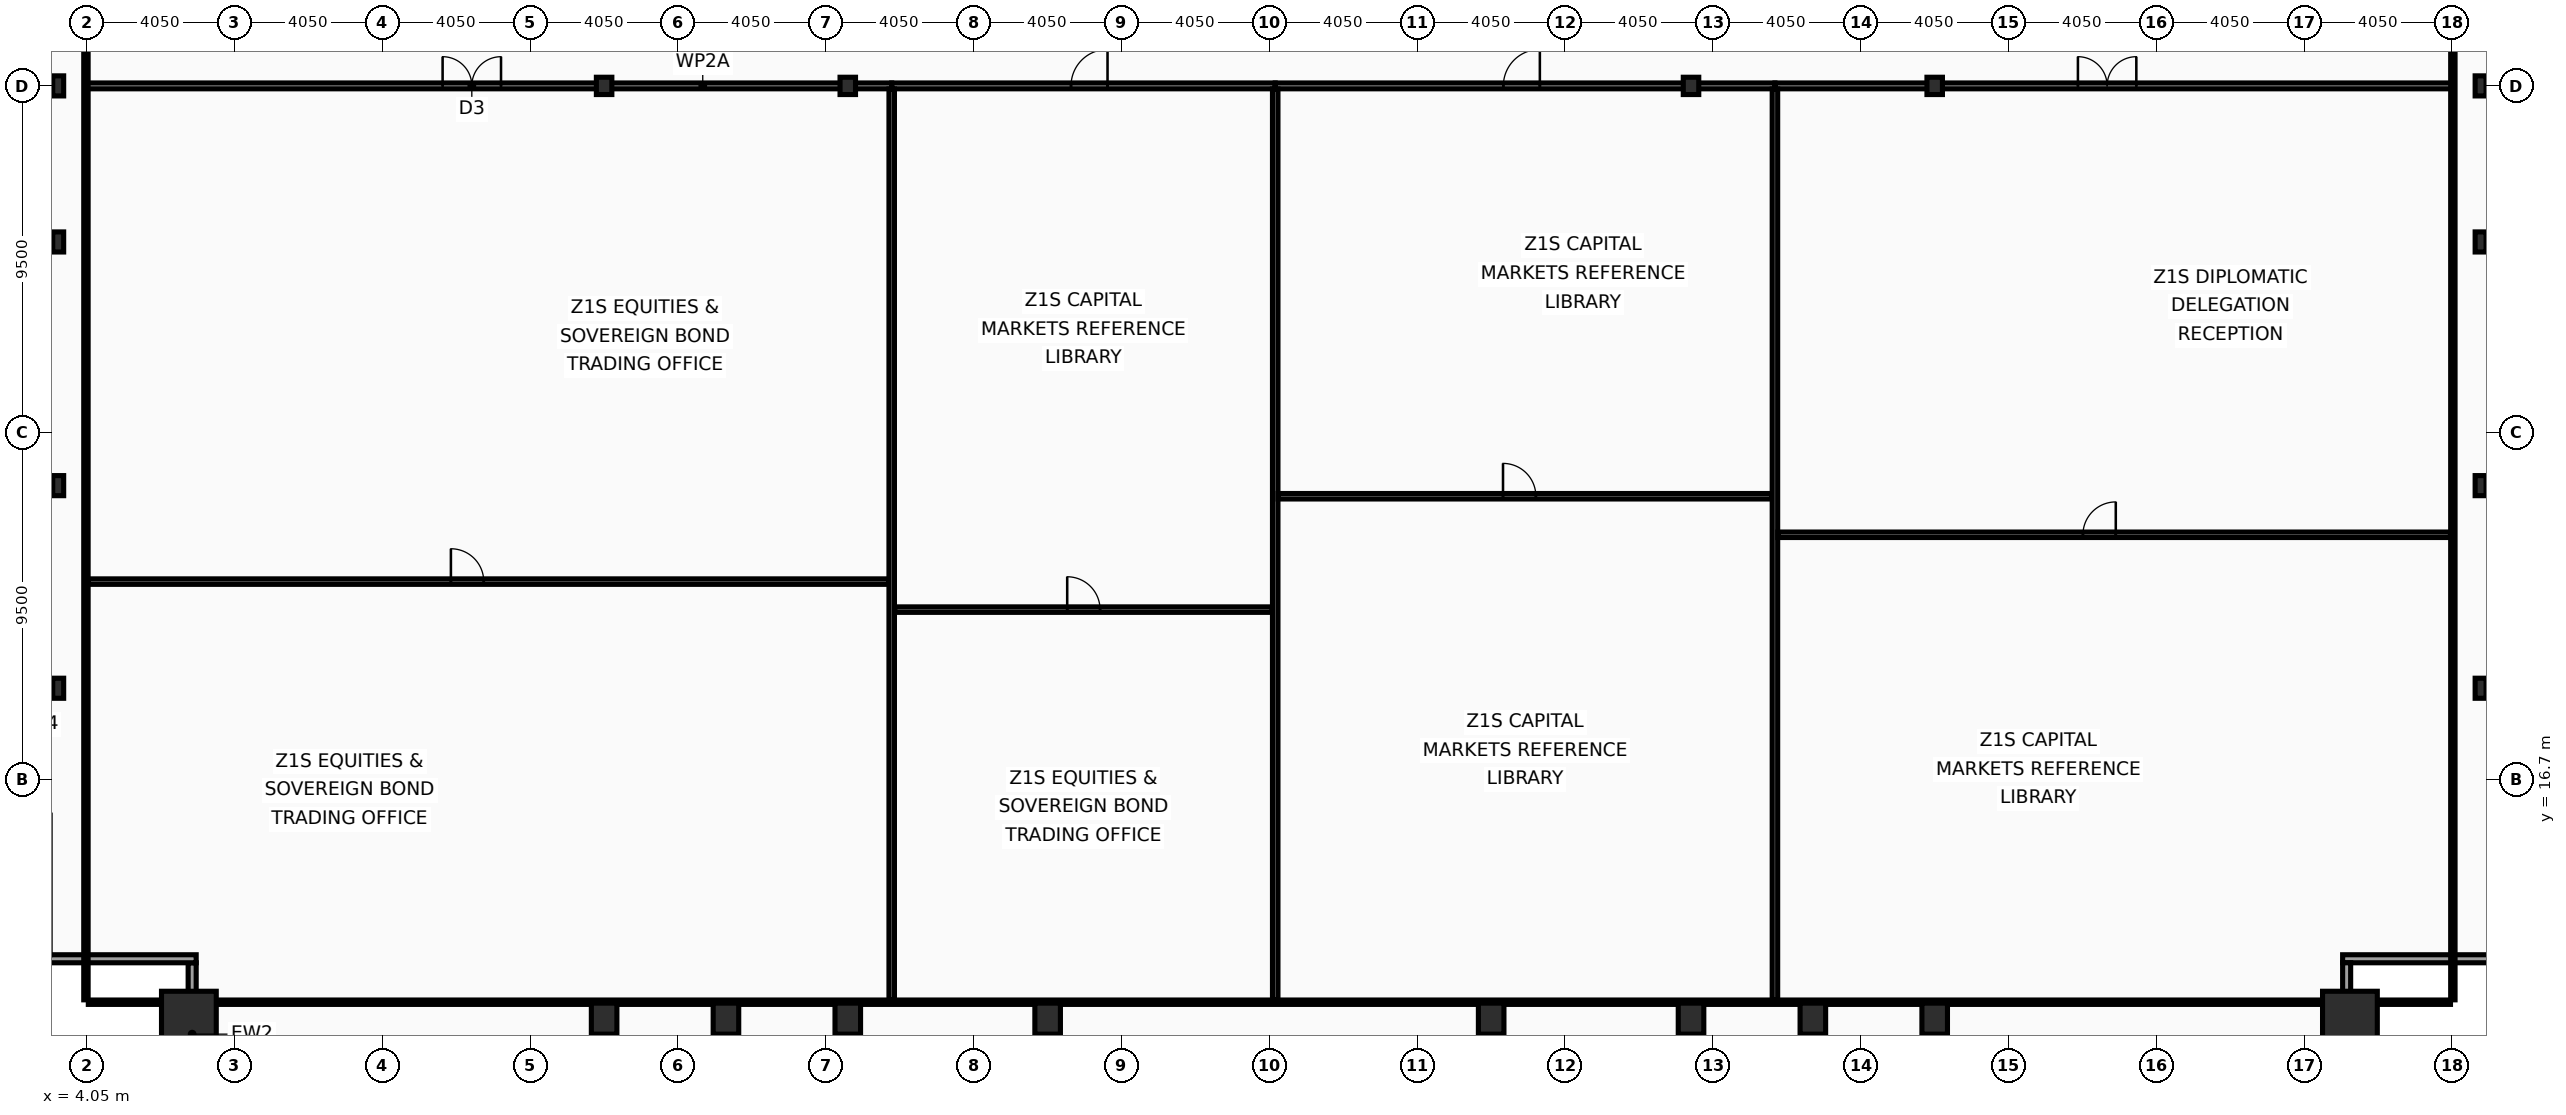
"""IFC4 building model, lengths in metres.
Left out: names, types, materials, properties, quantities, classifications, styles, units other than length and angle.
Written with IfcOpenShell. Run it as: python <this file> out.ifc"""

import sys

from ifc_helpers import new_model, si_unit, direction, frame, frame_2d, origin, origin_2d, place, context, subcontext, project, spatial, rectangle, hollow_rectangle, i_section, extrude, element, fill, save


model = new_model("IFC4")
c1 = context("Model", 3, precision=1e-05, world=origin(), true_north=direction((0.0, 1.0)))
c2 = subcontext(c1, "Body", "Model", "MODEL_VIEW")
j1 = project(units=[si_unit("LENGTHUNIT", "METRE"), si_unit("PLANEANGLEUNIT", "RADIAN")], contexts=[c1])
p1 = place(None, origin())
s1 = spatial("IfcSite", under=j1, at=p1, CompositionType="ELEMENT")
p2 = place(p1, origin())
s2 = spatial("IfcBuilding", under=s1, at=p2, CompositionType="ELEMENT")
p3 = place(p2, frame((0.0, 0.0, 98.6)))
s3 = spatial("IfcBuildingStorey", under=s2, at=p3, CompositionType="ELEMENT", Elevation=98.6)
for number, where, z_axis, x_axis in (
    (1, (6.85, 10.15, 0.0), (0.0, 0.0, 1.0), (1.0, 0.0, 0.0)),
    (2, (66.05, 10.15, 0.0), (0.0, 0.0, 1.0), (1.0, 0.0, 0.0)),
):
    element("IfcColumn", number, at=place(p3, frame(where, z_axis=z_axis, x_axis=x_axis)), inside=s3, PredefinedType="COLUMN", context=c2, shape_type="SweptSolid", body=[
        extrude(hollow_rectangle(XDim=1.5, YDim=1.5, WallThickness=0.07, at=origin_2d()), origin(), (0.0, 0.0, 1.0), 4.0),
    ])
for number, where, z_axis, x_axis in (
    (3, (18.225, 10.15, 0.0), (0.0, 0.0, 1.0), (1.0, 0.0, 0.0)),
    (4, (21.562, 10.15, 0.0), (0.0, 0.0, 1.0), (1.0, 0.0, 0.0)),
    (5, (24.9, 10.15, 0.0), (0.0, 0.0, 1.0), (1.0, 0.0, 0.0)),
    (6, (30.375, 10.15, 0.0), (0.0, 0.0, 1.0), (1.0, 0.0, 0.0)),
    (7, (42.525, 10.15, 0.0), (0.0, 0.0, 1.0), (1.0, 0.0, 0.0)),
    (8, (48.0, 10.15, 0.0), (0.0, 0.0, 1.0), (1.0, 0.0, 0.0)),
    (9, (51.337, 10.15, 0.0), (0.0, 0.0, 1.0), (1.0, 0.0, 0.0)),
    (10, (54.675, 10.15, 0.0), (0.0, 0.0, 1.0), (1.0, 0.0, 0.0)),
):
    element("IfcColumn", number, at=place(p3, frame(where, z_axis=z_axis, x_axis=x_axis)), inside=s3, PredefinedType="COLUMN", context=c2, shape_type="SweptSolid", body=[
        extrude(hollow_rectangle(XDim=0.7, YDim=0.85, WallThickness=0.05, at=origin_2d()), origin(), (0.0, 0.0, 1.0), 4.0),
    ])
for number, where, z_axis, x_axis in (
    (11, (3.27, 19.2, 0.0), (0.0, 0.0, 1.0), (1.0, 0.0, 0.0)),
    (12, (3.27, 24.75, 0.0), (0.0, 0.0, 1.0), (1.0, 0.0, 0.0)),
    (13, (3.27, 31.425, 0.0), (0.0, 0.0, 1.0), (1.0, 0.0, 0.0)),
    (14, (3.27, 35.7, 0.0), (0.0, 0.0, 1.0), (1.0, 0.0, 0.0)),
    (15, (69.63, 19.2, 0.0), (0.0, 0.0, 1.0), (1.0, 0.0, 0.0)),
    (16, (69.63, 24.75, 0.0), (0.0, 0.0, 1.0), (1.0, 0.0, 0.0)),
    (17, (69.63, 31.425, 0.0), (0.0, 0.0, 1.0), (1.0, 0.0, 0.0)),
    (18, (69.63, 35.7, 0.0), (0.0, 0.0, 1.0), (1.0, 0.0, 0.0)),
):
    element("IfcColumn", number, at=place(p3, frame(where, z_axis=z_axis, x_axis=x_axis)), inside=s3, PredefinedType="COLUMN", context=c2, shape_type="SweptSolid", body=[
        extrude(i_section(OverallWidth=0.3, OverallDepth=0.55, WebThickness=0.015, FlangeThickness=0.029, at=origin_2d()), origin(), (0.0, 0.0, 1.0), 4.0),
    ])
for number, where, z_axis, x_axis in (
    (19, (18.225, 35.7, 0.0), (0.0, 0.0, 1.0), (1.0, 0.0, 0.0)),
    (20, (24.9, 35.7, 0.0), (0.0, 0.0, 1.0), (1.0, 0.0, 0.0)),
    (21, (48.0, 35.7, 0.0), (0.0, 0.0, 1.0), (1.0, 0.0, 0.0)),
    (22, (54.675, 35.7, 0.0), (0.0, 0.0, 1.0), (1.0, 0.0, 0.0)),
):
    element("IfcColumn", number, at=place(p3, frame(where, z_axis=z_axis, x_axis=x_axis)), inside=s3, PredefinedType="COLUMN", context=c2, shape_type="SweptSolid", body=[
        extrude(i_section(OverallWidth=0.424, OverallDepth=0.474, WebThickness=0.048, FlangeThickness=0.077, at=origin_2d()), origin(), (0.0, 0.0, 1.0), 4.0),
    ])
p4 = place(p3, frame((6.94, 7.77, 0.0), z_axis=(0.0, 0.0, 1.0), x_axis=(0.0, 1.0, 0.0)))
e23 = element("IfcWall", 23, at=p4, inside=s3, PredefinedType="SOLIDWALL", context=c2, shape_type="SweptSolid", body=[
    extrude(rectangle(XDim=3.91, YDim=0.22, at=frame_2d((1.955, 0.0))), origin(), (0.0, 0.0, 1.0), 3.16),
])
for number, where, z_axis, x_axis in (
    (24, (7.05, 11.79, 0.0), (0.0, 0.0, 1.0), (-1.0, 0.0, 0.0)),
    (25, (70.07, 11.79, 0.0), (0.0, 0.0, 1.0), (-1.0, 0.0, 0.0)),
):
    element("IfcWall", number, at=place(p3, frame(where, z_axis=z_axis, x_axis=x_axis)), inside=s3, PredefinedType="SOLIDWALL", context=c2, shape_type="SweptSolid", body=[
        extrude(rectangle(XDim=4.22, YDim=0.22, at=frame_2d((2.11, 0.0))), origin(), (0.0, 0.0, 1.0), 3.16),
    ])
p5 = place(p3, frame((65.96, 11.68, 0.0), z_axis=(0.0, 0.0, 1.0), x_axis=(0.0, -1.0, 0.0)))
e26 = element("IfcWall", 26, at=p5, inside=s3, PredefinedType="SOLIDWALL", context=c2, shape_type="SweptSolid", body=[
    extrude(rectangle(XDim=3.91, YDim=0.22, at=frame_2d((1.955, 0.0))), origin(), (0.0, 0.0, 1.0), 3.16),
])
p6 = place(p3, frame((4.03, 35.7, 0.0), z_axis=(0.0, 0.0, 1.0), x_axis=(1.0, 0.0, 0.0)))
e27 = element("IfcWall", 27, at=p6, inside=s3, PredefinedType="PARTITIONING", context=c2, shape_type="SweptSolid", body=[
    extrude(rectangle(XDim=22.073, YDim=0.16, at=frame_2d((11.037, 0.0))), origin(), (0.0, 0.0, 1.0), 3.01),
])
p7 = place(p6, frame((9.771, 0.0, 0.0)))
e28 = element("IfcOpeningElement", 28, at=p7, cuts=e27, PredefinedType="OPENING", context=c2, shape_type="SweptSolid", body=[
    extrude(rectangle(XDim=1.6, YDim=2.15, at=frame_2d((0.8, 1.075))), frame((0.0, 0.09, 0.0), z_axis=(0.0, -1.0, 0.0), x_axis=(1.0, 0.0, 0.0)), (0.0, 0.0, 1.0), 0.18),
])
p8 = place(p3, frame((4.095, 22.121, 0.0), z_axis=(0.0, 0.0, 1.0), x_axis=(1.0, 0.0, 0.0)))
e29 = element("IfcWall", 29, at=p8, inside=s3, PredefinedType="PARTITIONING", context=c2, shape_type="SweptSolid", body=[
    extrude(rectangle(XDim=21.928, YDim=0.15, at=frame_2d((10.964, 0.0))), origin(), (0.0, 0.0, 1.0), 3.01),
])
p9 = place(p8, frame((9.933, 0.0, 0.0)))
e30 = element("IfcOpeningElement", 30, at=p9, cuts=e29, PredefinedType="OPENING", context=c2, shape_type="SweptSolid", body=[
    extrude(rectangle(XDim=0.9, YDim=2.05, at=frame_2d((0.45, 1.025))), frame((0.0, 0.085, 0.0), z_axis=(0.0, -1.0, 0.0), x_axis=(1.0, 0.0, 0.0)), (0.0, 0.0, 1.0), 0.17),
])
p10 = place(p3, frame((26.103, 35.7, 0.0), z_axis=(0.0, 0.0, 1.0), x_axis=(1.0, 0.0, 0.0)))
e31 = element("IfcWall", 31, at=p10, inside=s3, PredefinedType="PARTITIONING", context=c2, shape_type="SweptSolid", body=[
    extrude(rectangle(XDim=10.506, YDim=0.16, at=frame_2d((5.253, 0.0))), origin(), (0.0, 0.0, 1.0), 3.01),
])
p11 = place(p10, frame((4.913, 0.0, 0.0)))
e32 = element("IfcOpeningElement", 32, at=p11, cuts=e31, PredefinedType="OPENING", context=c2, shape_type="SweptSolid", body=[
    extrude(rectangle(XDim=1.0, YDim=2.05, at=frame_2d((0.5, 1.025))), frame((0.0, 0.09, 0.0), z_axis=(0.0, -1.0, 0.0), x_axis=(1.0, 0.0, 0.0)), (0.0, 0.0, 1.0), 0.18),
])
p12 = place(p3, frame((26.103, 10.665, 0.0), z_axis=(0.0, 0.0, 1.0), x_axis=(0.0, 1.0, 0.0)))
e33 = element("IfcWall", 33, at=p12, inside=s3, PredefinedType="PARTITIONING", context=c2, shape_type="SweptSolid", body=[
    extrude(rectangle(XDim=24.95, YDim=0.15, at=frame_2d((12.475, 0.0))), origin(), (0.0, 0.0, 1.0), 3.26),
])
p13 = place(p3, frame((26.183, 21.354, 0.0), z_axis=(0.0, 0.0, 1.0), x_axis=(1.0, 0.0, 0.0)))
e34 = element("IfcWall", 34, at=p13, inside=s3, PredefinedType="PARTITIONING", context=c2, shape_type="SweptSolid", body=[
    extrude(rectangle(XDim=10.346, YDim=0.15, at=frame_2d((5.173, 0.0))), origin(), (0.0, 0.0, 1.0), 3.01),
])
p14 = place(p13, frame((4.728, 0.0, 0.0)))
e35 = element("IfcOpeningElement", 35, at=p14, cuts=e34, PredefinedType="OPENING", context=c2, shape_type="SweptSolid", body=[
    extrude(rectangle(XDim=0.9, YDim=2.05, at=frame_2d((0.45, 1.025))), frame((0.0, 0.085, 0.0), z_axis=(0.0, -1.0, 0.0), x_axis=(1.0, 0.0, 0.0)), (0.0, 0.0, 1.0), 0.17),
])
p15 = place(p3, frame((36.609, 35.7, 0.0), z_axis=(0.0, 0.0, 1.0), x_axis=(1.0, 0.0, 0.0)))
e36 = element("IfcWall", 36, at=p15, inside=s3, PredefinedType="PARTITIONING", context=c2, shape_type="SweptSolid", body=[
    extrude(rectangle(XDim=13.69, YDim=0.16, at=frame_2d((6.845, 0.0))), origin(), (0.0, 0.0, 1.0), 3.01),
])
p16 = place(p15, frame((6.25, 0.0, 0.0)))
e37 = element("IfcOpeningElement", 37, at=p16, cuts=e36, PredefinedType="OPENING", context=c2, shape_type="SweptSolid", body=[
    extrude(rectangle(XDim=1.0, YDim=2.05, at=frame_2d((0.5, 1.025))), frame((0.0, 0.09, 0.0), z_axis=(0.0, -1.0, 0.0), x_axis=(1.0, 0.0, 0.0)), (0.0, 0.0, 1.0), 0.18),
])
p17 = place(p3, frame((36.609, 10.665, 0.0), z_axis=(0.0, 0.0, 1.0), x_axis=(0.0, 1.0, 0.0)))
e38 = element("IfcWall", 38, at=p17, inside=s3, PredefinedType="PARTITIONING", context=c2, shape_type="SweptSolid", body=[
    extrude(rectangle(XDim=24.95, YDim=0.15, at=frame_2d((12.475, 0.0))), origin(), (0.0, 0.0, 1.0), 3.26),
])
p18 = place(p3, frame((36.689, 24.459, 0.0), z_axis=(0.0, 0.0, 1.0), x_axis=(1.0, 0.0, 0.0)))
e39 = element("IfcWall", 39, at=p18, inside=s3, PredefinedType="PARTITIONING", context=c2, shape_type="SweptSolid", body=[
    extrude(rectangle(XDim=13.53, YDim=0.15, at=frame_2d((6.765, 0.0))), origin(), (0.0, 0.0, 1.0), 3.01),
])
p19 = place(p18, frame((6.16, 0.0, 0.0)))
e40 = element("IfcOpeningElement", 40, at=p19, cuts=e39, PredefinedType="OPENING", context=c2, shape_type="SweptSolid", body=[
    extrude(rectangle(XDim=0.9, YDim=2.05, at=frame_2d((0.45, 1.025))), frame((0.0, 0.085, 0.0), z_axis=(0.0, -1.0, 0.0), x_axis=(1.0, 0.0, 0.0)), (0.0, 0.0, 1.0), 0.17),
])
p20 = place(p3, frame((50.299, 35.7, 0.0), z_axis=(0.0, 0.0, 1.0), x_axis=(1.0, 0.0, 0.0)))
e41 = element("IfcWall", 41, at=p20, inside=s3, PredefinedType="PARTITIONING", context=c2, shape_type="SweptSolid", body=[
    extrude(rectangle(XDim=18.571, YDim=0.16, at=frame_2d((9.286, 0.0))), origin(), (0.0, 0.0, 1.0), 3.01),
])
p21 = place(p20, frame((8.3, 0.0, 0.0)))
e42 = element("IfcOpeningElement", 42, at=p21, cuts=e41, PredefinedType="OPENING", context=c2, shape_type="SweptSolid", body=[
    extrude(rectangle(XDim=1.6, YDim=2.15, at=frame_2d((0.8, 1.075))), frame((0.0, 0.09, 0.0), z_axis=(0.0, -1.0, 0.0), x_axis=(1.0, 0.0, 0.0)), (0.0, 0.0, 1.0), 0.18),
])
p22 = place(p3, frame((50.299, 10.665, 0.0), z_axis=(0.0, 0.0, 1.0), x_axis=(0.0, 1.0, 0.0)))
e43 = element("IfcWall", 43, at=p22, inside=s3, PredefinedType="PARTITIONING", context=c2, shape_type="SweptSolid", body=[
    extrude(rectangle(XDim=24.95, YDim=0.15, at=frame_2d((12.475, 0.0))), origin(), (0.0, 0.0, 1.0), 3.26),
])
p23 = place(p3, frame((50.379, 23.404, 0.0), z_axis=(0.0, 0.0, 1.0), x_axis=(1.0, 0.0, 0.0)))
e44 = element("IfcWall", 44, at=p23, inside=s3, PredefinedType="PARTITIONING", context=c2, shape_type="SweptSolid", body=[
    extrude(rectangle(XDim=18.426, YDim=0.15, at=frame_2d((9.213, 0.0))), origin(), (0.0, 0.0, 1.0), 3.01),
])
p24 = place(p23, frame((8.357, 0.0, 0.0)))
e45 = element("IfcOpeningElement", 45, at=p24, cuts=e44, PredefinedType="OPENING", context=c2, shape_type="SweptSolid", body=[
    extrude(rectangle(XDim=0.9, YDim=2.05, at=frame_2d((0.45, 1.025))), frame((0.0, 0.085, 0.0), z_axis=(0.0, -1.0, 0.0), x_axis=(1.0, 0.0, 0.0)), (0.0, 0.0, 1.0), 0.17),
])
for number, where, z_axis, x_axis in (
    (46, (4.03, 10.665, 0.0), (0.0, 0.0, 1.0), (0.0, 1.0, 0.0)),
    (47, (68.87, 10.665, 0.0), (0.0, 0.0, 1.0), (0.0, 1.0, 0.0)),
):
    element("IfcWall", number, at=place(p3, frame(where, z_axis=z_axis, x_axis=x_axis)), inside=s3, PredefinedType="PARTITIONING", context=c2, shape_type="SweptSolid", body=[
        extrude(rectangle(XDim=42.11, YDim=0.12, at=frame_2d((21.055, 0.0))), origin(), (0.0, 0.0, 1.0), 3.01),
    ])
p25 = place(p3, frame((4.095, 10.6, 0.0), z_axis=(0.0, 0.0, 1.0), x_axis=(1.0, 0.0, 0.0)))
e48 = element("IfcWall", 48, at=p25, inside=s3, PredefinedType="PARTITIONING", context=c2, shape_type="SweptSolid", body=[
    extrude(rectangle(XDim=64.71, YDim=0.12, at=frame_2d((32.355, 0.0))), origin(), (0.0, 0.0, 1.0), 3.01),
])
p26 = place(p7, origin())
e49 = element("IfcDoor", 49, at=p26, inside=s3, OperationType="DOUBLE_DOOR_SINGLE_SWING", PredefinedType="DOOR", context=c2, shape_type="SweptSolid", body=[
    extrude(rectangle(XDim=1.6, YDim=2.15, at=frame_2d((0.8, 1.075))), frame((0.0, 0.025, 0.0), z_axis=(0.0, -1.0, 0.0), x_axis=(1.0, 0.0, 0.0)), (0.0, 0.0, 1.0), 0.05),
])
fill(e28, e49)
p27 = place(p9, origin())
e50 = element("IfcDoor", 50, at=p27, inside=s3, OperationType="SINGLE_SWING_LEFT", PredefinedType="DOOR", context=c2, shape_type="SweptSolid", body=[
    extrude(rectangle(XDim=0.9, YDim=2.05, at=frame_2d((0.45, 1.025))), frame((0.0, 0.025, 0.0), z_axis=(0.0, -1.0, 0.0), x_axis=(1.0, 0.0, 0.0)), (0.0, 0.0, 1.0), 0.05),
])
fill(e30, e50)
p28 = place(p11, origin())
e51 = element("IfcDoor", 51, at=p28, inside=s3, OperationType="SINGLE_SWING_RIGHT", PredefinedType="DOOR", context=c2, shape_type="SweptSolid", body=[
    extrude(rectangle(XDim=1.0, YDim=2.05, at=frame_2d((0.5, 1.025))), frame((0.0, 0.025, 0.0), z_axis=(0.0, -1.0, 0.0), x_axis=(1.0, 0.0, 0.0)), (0.0, 0.0, 1.0), 0.05),
])
fill(e32, e51)
p29 = place(p14, origin())
e52 = element("IfcDoor", 52, at=p29, inside=s3, OperationType="SINGLE_SWING_LEFT", PredefinedType="DOOR", context=c2, shape_type="SweptSolid", body=[
    extrude(rectangle(XDim=0.9, YDim=2.05, at=frame_2d((0.45, 1.025))), frame((0.0, 0.025, 0.0), z_axis=(0.0, -1.0, 0.0), x_axis=(1.0, 0.0, 0.0)), (0.0, 0.0, 1.0), 0.05),
])
fill(e35, e52)
p30 = place(p16, origin())
e53 = element("IfcDoor", 53, at=p30, inside=s3, OperationType="SINGLE_SWING_RIGHT", PredefinedType="DOOR", context=c2, shape_type="SweptSolid", body=[
    extrude(rectangle(XDim=1.0, YDim=2.05, at=frame_2d((0.5, 1.025))), frame((0.0, 0.025, 0.0), z_axis=(0.0, -1.0, 0.0), x_axis=(1.0, 0.0, 0.0)), (0.0, 0.0, 1.0), 0.05),
])
fill(e37, e53)
p31 = place(p19, origin())
e54 = element("IfcDoor", 54, at=p31, inside=s3, OperationType="SINGLE_SWING_LEFT", PredefinedType="DOOR", context=c2, shape_type="SweptSolid", body=[
    extrude(rectangle(XDim=0.9, YDim=2.05, at=frame_2d((0.45, 1.025))), frame((0.0, 0.025, 0.0), z_axis=(0.0, -1.0, 0.0), x_axis=(1.0, 0.0, 0.0)), (0.0, 0.0, 1.0), 0.05),
])
fill(e40, e54)
p32 = place(p21, origin())
e55 = element("IfcDoor", 55, at=p32, inside=s3, OperationType="DOUBLE_DOOR_SINGLE_SWING", PredefinedType="DOOR", context=c2, shape_type="SweptSolid", body=[
    extrude(rectangle(XDim=1.6, YDim=2.15, at=frame_2d((0.8, 1.075))), frame((0.0, 0.025, 0.0), z_axis=(0.0, -1.0, 0.0), x_axis=(1.0, 0.0, 0.0)), (0.0, 0.0, 1.0), 0.05),
])
fill(e42, e55)
p33 = place(p24, origin())
e56 = element("IfcDoor", 56, at=p33, inside=s3, OperationType="SINGLE_SWING_RIGHT", PredefinedType="DOOR", context=c2, shape_type="SweptSolid", body=[
    extrude(rectangle(XDim=0.9, YDim=2.05, at=frame_2d((0.45, 1.025))), frame((0.0, 0.025, 0.0), z_axis=(0.0, -1.0, 0.0), x_axis=(1.0, 0.0, 0.0)), (0.0, 0.0, 1.0), 0.05),
])
fill(e45, e56)
save(model, sys.argv[1])
